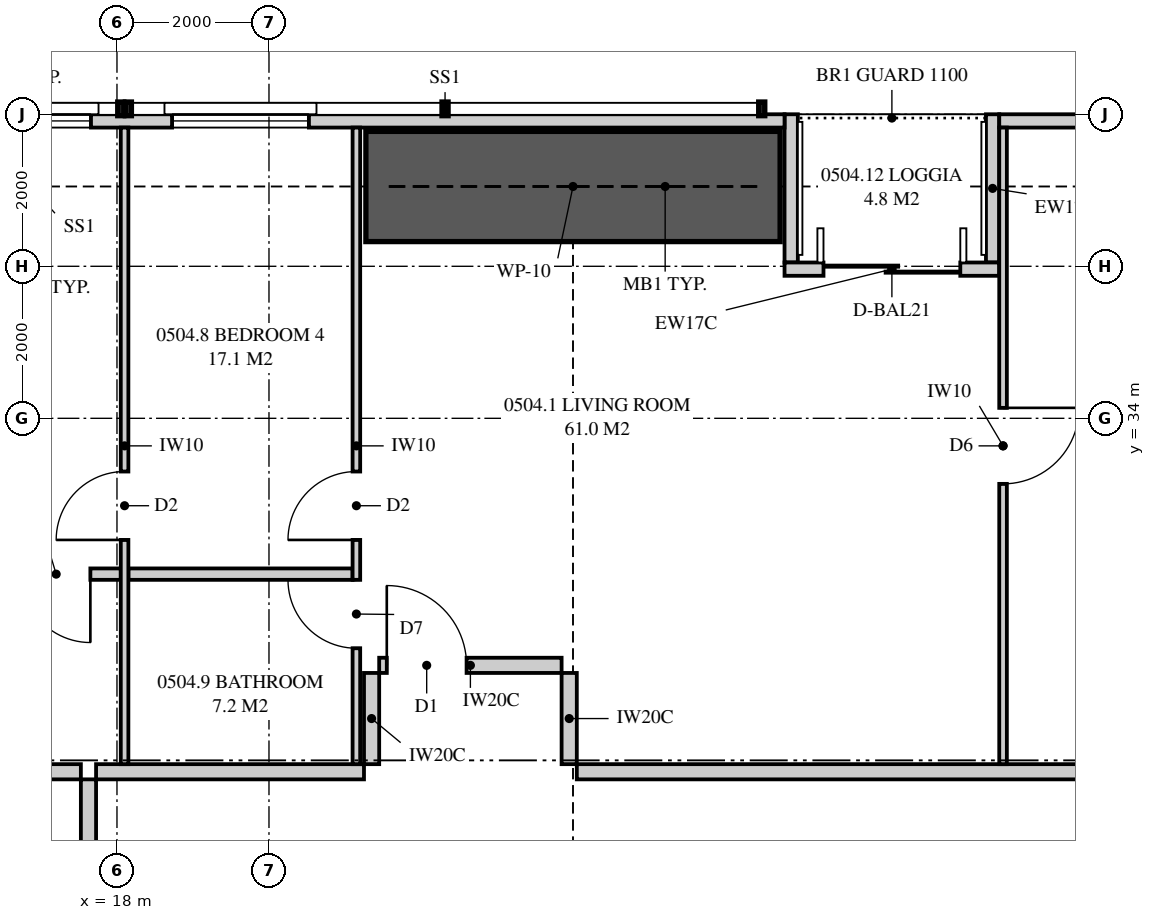
"""IFC4 building model, lengths in metres.
Left out: names, types, materials, properties, quantities, classifications, styles, units other than length and angle.
Written with IfcOpenShell. Run it as: python <this file> out.ifc"""

import sys

from ifc_helpers import new_model, si_unit, direction, frame, frame_2d, origin, place, context, subcontext, project, spatial, polyline, rectangle, outline, extrude, element, fill, save


model = new_model("IFC4")
c1 = context("Model", 3, precision=1e-05, world=origin(), true_north=direction((0.0, 1.0)))
c2 = subcontext(c1, "Body", "Model", "MODEL_VIEW")
j1 = project(units=[si_unit("LENGTHUNIT", "METRE"), si_unit("PLANEANGLEUNIT", "RADIAN")], contexts=[c1])
p1 = place(None, origin())
s1 = spatial("IfcSite", under=j1, at=p1, CompositionType="ELEMENT")
p2 = place(p1, origin())
s2 = spatial("IfcBuilding", under=s1, at=p2, CompositionType="ELEMENT")
p3 = place(p2, frame((0.0, 0.0, 24.35)))
s3 = spatial("IfcBuildingStorey", under=s2, at=p3, CompositionType="ELEMENT", Elevation=24.35)
p4 = place(p3, frame((38.174, 37.913, 0.0), z_axis=(0.0, 0.0, 1.0), x_axis=(-1.0, 0.0, 0.0)))
e1 = element("IfcWall", 1, at=p4, inside=s3, PredefinedType="SOLIDWALL", context=c2, shape_type="SweptSolid", body=[
    extrude(outline(polyline([(0.0, 0.0), (8.565, 0.0), (8.565, 2.15), (3.174, 2.15), (3.174, 3.11), (3.018, 3.11), (3.018, 2.15), (2.97, 2.15), (2.97, 3.11), (0.0, 3.11), (0.0, 0.0)])), frame((0.0, 0.087, 0.0), z_axis=(0.0, -1.0, 0.0), x_axis=(1.0, 0.0, 0.0)), (0.0, 0.0, 1.0), 0.175),
])
p5 = place(p4, frame((6.092, 0.0, 0.4)))
e2 = element("IfcOpeningElement", 2, at=p5, cuts=e1, PredefinedType="OPENING", context=c2, shape_type="SweptSolid", body=[
    extrude(rectangle(XDim=1.2, YDim=1.7, at=frame_2d((0.6, 0.85))), frame((0.0, 0.097, 0.0), z_axis=(0.0, -1.0, 0.0), x_axis=(1.0, 0.0, 0.0)), (0.0, 0.0, 1.0), 0.195),
])
p6 = place(p3, frame((26.783, 37.913, 0.0), z_axis=(0.0, 0.0, 1.0), x_axis=(-1.0, 0.0, 0.0)))
e3 = element("IfcWall", 3, at=p6, inside=s3, PredefinedType="SOLIDWALL", context=c2, shape_type="SweptSolid", body=[
    extrude(outline(polyline([(0.0, 0.0), (21.732, 0.0), (21.732, 3.11), (13.987, 3.11), (13.987, 2.15), (13.939, 2.15), (13.939, 3.11), (13.783, 3.11), (13.783, 2.15), (0.0, 2.15), (0.0, 0.0)])), frame((0.0, 0.087, 0.0), z_axis=(0.0, -1.0, 0.0), x_axis=(1.0, 0.0, 0.0)), (0.0, 0.0, 1.0), 0.175),
])
p7 = place(p6, frame((6.258, 0.0, 0.4)))
e4 = element("IfcOpeningElement", 4, at=p7, cuts=e3, PredefinedType="OPENING", context=c2, shape_type="SweptSolid", body=[
    extrude(rectangle(XDim=1.8, YDim=1.7, at=frame_2d((0.9, 0.85))), frame((0.0, 0.097, 0.0), z_axis=(0.0, -1.0, 0.0), x_axis=(1.0, 0.0, 0.0)), (0.0, 0.0, 1.0), 0.195),
])
p8 = place(p6, frame((9.126, 0.0, 0.4)))
e5 = element("IfcOpeningElement", 5, at=p8, cuts=e3, PredefinedType="OPENING", context=c2, shape_type="SweptSolid", body=[
    extrude(rectangle(XDim=1.8, YDim=1.7, at=frame_2d((0.9, 0.85))), frame((0.0, 0.097, 0.0), z_axis=(0.0, -1.0, 0.0), x_axis=(1.0, 0.0, 0.0)), (0.0, 0.0, 1.0), 0.195),
])
p9 = place(p6, frame((16.613, 0.0, 0.4)))
e6 = element("IfcOpeningElement", 6, at=p9, cuts=e3, PredefinedType="OPENING", context=c2, shape_type="SweptSolid", body=[
    extrude(rectangle(XDim=1.8, YDim=1.7, at=frame_2d((0.9, 0.85))), frame((0.0, 0.097, 0.0), z_axis=(0.0, -1.0, 0.0), x_axis=(1.0, 0.0, 0.0)), (0.0, 0.0, 1.0), 0.195),
])
p10 = place(p3, frame((29.608, 35.962, 0.0), z_axis=(0.0, 0.0, 1.0), x_axis=(-1.0, 0.0, 0.0)))
e7 = element("IfcWall", 7, at=p10, inside=s3, PredefinedType="SOLIDWALL", context=c2, shape_type="SweptSolid", body=[
    extrude(rectangle(XDim=2.825, YDim=0.175, at=frame_2d((1.413, 0.0))), origin(), (0.0, 0.0, 1.0), 3.11),
])
p11 = place(p10, frame((0.512, 0.0, 0.0)))
e8 = element("IfcOpeningElement", 8, at=p11, cuts=e7, PredefinedType="OPENING", context=c2, shape_type="SweptSolid", body=[
    extrude(rectangle(XDim=1.8, YDim=2.1, at=frame_2d((0.9, 1.05))), frame((0.0, 0.097, 0.0), z_axis=(0.0, -1.0, 0.0), x_axis=(1.0, 0.0, 0.0)), (0.0, 0.0, 1.0), 0.195),
])
for number, where, z_axis, x_axis in (
    (9, (29.521, 38.0, 0.0), (0.0, 0.0, 1.0), (0.0, -1.0, 0.0)),
    (10, (26.871, 38.0, 0.0), (0.0, 0.0, 1.0), (0.0, -1.0, 0.0)),
):
    element("IfcWall", number, at=place(p3, frame(where, z_axis=z_axis, x_axis=x_axis)), inside=s3, PredefinedType="SOLIDWALL", context=c2, shape_type="SweptSolid", body=[
        extrude(outline(polyline([(0.0, 0.0), (1.95, 0.0), (1.95, 3.11), (1.75, 3.11), (1.75, 2.15), (0.15, 2.15), (0.15, 3.11), (0.0, 3.11), (0.0, 0.0)])), frame((0.0, 0.087, 0.0), z_axis=(0.0, -1.0, 0.0), x_axis=(1.0, 0.0, 0.0)), (0.0, 0.0, 1.0), 0.175),
    ])
p12 = place(p3, frame((17.725, 29.35, 0.0), z_axis=(0.0, 0.0, 1.0), x_axis=(1.0, 0.0, 0.0)))
e11 = element("IfcWall", 11, at=p12, inside=s3, PredefinedType="PARTITIONING", context=c2, shape_type="SweptSolid", body=[
    extrude(rectangle(XDim=3.525, YDim=0.2, at=frame_2d((1.762, 0.0))), origin(), (0.0, 0.0, 1.0), 3.11),
])
p13 = place(p3, frame((18.1, 37.825, 0.0), z_axis=(0.0, 0.0, 1.0), x_axis=(0.0, -1.0, 0.0)))
e12 = element("IfcWall", 12, at=p13, inside=s3, PredefinedType="PARTITIONING", context=c2, shape_type="SweptSolid", body=[
    extrude(outline(polyline([(0.0, 0.0), (8.375, 0.0), (8.375, 3.11), (1.635, 3.11), (1.635, 2.15), (0.0, 2.15), (0.0, 3.11), (0.0, 0.0)])), frame((0.0, 0.05, 0.0), z_axis=(0.0, -1.0, 0.0), x_axis=(1.0, 0.0, 0.0)), (0.0, 0.0, 1.0), 0.1),
])
p14 = place(p13, frame((4.525, 0.0, 0.0)))
e13 = element("IfcOpeningElement", 13, at=p14, cuts=e12, PredefinedType="OPENING", context=c2, shape_type="SweptSolid", body=[
    extrude(rectangle(XDim=0.9, YDim=2.1, at=frame_2d((0.45, 1.05))), frame((0.0, 0.06, 0.0), z_axis=(0.0, -1.0, 0.0), x_axis=(1.0, 0.0, 0.0)), (0.0, 0.0, 1.0), 0.12),
])
p15 = place(p3, frame((21.15, 37.825, 0.0), z_axis=(0.0, 0.0, 1.0), x_axis=(0.0, -1.0, 0.0)))
e14 = element("IfcWall", 14, at=p15, inside=s3, PredefinedType="PARTITIONING", context=c2, shape_type="SweptSolid", body=[
    extrude(outline(polyline([(0.0, 0.0), (8.375, 0.0), (8.375, 3.11), (1.635, 3.11), (1.635, 2.15), (0.0, 2.15), (0.0, 3.11), (0.0, 0.0)])), frame((0.0, 0.05, 0.0), z_axis=(0.0, -1.0, 0.0), x_axis=(1.0, 0.0, 0.0)), (0.0, 0.0, 1.0), 0.1),
])
p16 = place(p15, frame((4.525, 0.0, 0.0)))
e15 = element("IfcOpeningElement", 15, at=p16, cuts=e14, PredefinedType="OPENING", context=c2, shape_type="SweptSolid", body=[
    extrude(rectangle(XDim=0.9, YDim=2.1, at=frame_2d((0.45, 1.05))), frame((0.0, 0.06, 0.0), z_axis=(0.0, -1.0, 0.0), x_axis=(1.0, 0.0, 0.0)), (0.0, 0.0, 1.0), 0.12),
])
p17 = place(p15, frame((5.95, 0.0, 0.0)))
e16 = element("IfcOpeningElement", 16, at=p17, cuts=e14, PredefinedType="OPENING", context=c2, shape_type="SweptSolid", body=[
    extrude(rectangle(XDim=0.9, YDim=2.1, at=frame_2d((0.45, 1.05))), frame((0.0, 0.06, 0.0), z_axis=(0.0, -1.0, 0.0), x_axis=(1.0, 0.0, 0.0)), (0.0, 0.0, 1.0), 0.12),
])
p18 = place(p3, frame((13.85, 31.95, 0.0), z_axis=(0.0, 0.0, 1.0), x_axis=(1.0, 0.0, 0.0)))
e17 = element("IfcWall", 17, at=p18, inside=s3, PredefinedType="PLUMBINGWALL", context=c2, shape_type="SweptSolid", body=[
    extrude(rectangle(XDim=4.2, YDim=0.15, at=frame_2d((2.1, 0.0))), origin(), (0.0, 0.0, 1.0), 3.11),
])
p19 = place(p18, frame((2.9, 0.0, 0.0)))
e18 = element("IfcOpeningElement", 18, at=p19, cuts=e17, PredefinedType="OPENING", context=c2, shape_type="SweptSolid", body=[
    extrude(rectangle(XDim=0.9, YDim=2.1, at=frame_2d((0.45, 1.05))), frame((0.0, 0.085, 0.0), z_axis=(0.0, -1.0, 0.0), x_axis=(1.0, 0.0, 0.0)), (0.0, 0.0, 1.0), 0.17),
])
p20 = place(p3, frame((18.15, 31.95, 0.0), z_axis=(0.0, 0.0, 1.0), x_axis=(1.0, 0.0, 0.0)))
e19 = element("IfcWall", 19, at=p20, inside=s3, PredefinedType="PLUMBINGWALL", context=c2, shape_type="SweptSolid", body=[
    extrude(rectangle(XDim=2.95, YDim=0.15, at=frame_2d((1.475, 0.0))), origin(), (0.0, 0.0, 1.0), 3.11),
])
p21 = place(p3, frame((29.658, 37.825, 0.0), z_axis=(0.0, 0.0, 1.0), x_axis=(0.0, -1.0, 0.0)))
e20 = element("IfcWall", 20, at=p21, inside=s3, PredefinedType="PARTITIONING", context=c2, shape_type="SweptSolid", body=[
    extrude(outline(polyline([(0.0, 0.0), (8.375, 0.0), (8.375, 3.11), (1.635, 3.11), (1.635, 2.15), (0.0, 2.15), (0.0, 3.11), (0.0, 0.0)])), frame((0.0, 0.05, 0.0), z_axis=(0.0, -1.0, 0.0), x_axis=(1.0, 0.0, 0.0)), (0.0, 0.0, 1.0), 0.1),
])
p22 = place(p21, frame((3.688, 0.0, 0.0)))
e21 = element("IfcOpeningElement", 21, at=p22, cuts=e20, PredefinedType="OPENING", context=c2, shape_type="SweptSolid", body=[
    extrude(rectangle(XDim=1.0, YDim=2.1, at=frame_2d((0.5, 1.05))), frame((0.0, 0.06, 0.0), z_axis=(0.0, -1.0, 0.0), x_axis=(1.0, 0.0, 0.0)), (0.0, 0.0, 1.0), 0.12),
])
p23 = place(p3, frame((2.0, 29.35, 0.0), z_axis=(0.0, 0.0, 1.0), x_axis=(1.0, 0.0, 0.0)))
e22 = element("IfcWall", 22, at=p23, inside=s3, PredefinedType="PARTITIONING", context=c2, shape_type="SweptSolid", body=[
    extrude(outline(polyline([(0.0, 0.0), (15.525, 0.0), (15.525, 3.11), (11.337, 3.11), (11.337, 2.541), (10.663, 2.541), (10.663, 3.11), (9.51, 3.11), (9.51, 2.51), (6.89, 2.51), (6.89, 3.11), (2.969, 3.11), (2.969, 2.541), (2.577, 2.541), (2.577, 2.15), (0.733, 2.15), (0.733, 3.11), (0.0, 3.11), (0.0, 0.0)])), frame((0.0, 0.1, 0.0), z_axis=(0.0, -1.0, 0.0), x_axis=(1.0, 0.0, 0.0)), (0.0, 0.0, 1.0), 0.2),
])
p24 = place(p3, frame((24.05, 29.35, 0.0), z_axis=(0.0, 0.0, 1.0), x_axis=(1.0, 0.0, 0.0)))
e23 = element("IfcWall", 23, at=p24, inside=s3, PredefinedType="PARTITIONING", context=c2, shape_type="SweptSolid", body=[
    extrude(outline(polyline([(0.0, 0.0), (13.05, 0.0), (13.05, 3.11), (11.287, 3.11), (11.287, 2.541), (10.613, 2.541), (10.613, 3.11), (0.287, 3.11), (0.287, 2.541), (0.0, 2.541), (0.0, 3.11), (0.0, 0.0)])), frame((0.0, 0.1, 0.0), z_axis=(0.0, -1.0, 0.0), x_axis=(1.0, 0.0, 0.0)), (0.0, 0.0, 1.0), 0.2),
])
p25 = place(p3, frame((21.45, 30.75, 0.0), z_axis=(0.0, 0.0, 1.0), x_axis=(1.0, 0.0, 0.0)))
e24 = element("IfcWall", 24, at=p25, inside=s3, PredefinedType="PARTITIONING", context=c2, shape_type="SweptSolid", body=[
    extrude(outline(polyline([(0.0, 0.0), (2.4, 0.0), (2.4, 3.11), (2.4, 2.541), (2.213, 2.541), (2.213, 3.11), (0.0, 3.11), (0.0, 0.0)])), frame((0.0, 0.1, 0.0), z_axis=(0.0, -1.0, 0.0), x_axis=(1.0, 0.0, 0.0)), (0.0, 0.0, 1.0), 0.2),
])
p26 = place(p25, frame((0.1, 0.0, 0.0)))
e25 = element("IfcOpeningElement", 25, at=p26, cuts=e24, PredefinedType="OPENING", context=c2, shape_type="SweptSolid", body=[
    extrude(rectangle(XDim=1.05, YDim=2.2, at=frame_2d((0.525, 1.1))), frame((0.0, 0.11, 0.0), z_axis=(0.0, -1.0, 0.0), x_axis=(1.0, 0.0, 0.0)), (0.0, 0.0, 1.0), 0.22),
])
p27 = place(p3, frame((21.35, 29.45, 0.0), z_axis=(0.0, 0.0, 1.0), x_axis=(0.0, 1.0, 0.0)))
e26 = element("IfcWall", 26, at=p27, inside=s3, PredefinedType="PARTITIONING", context=c2, shape_type="SweptSolid", body=[
    extrude(rectangle(XDim=1.2, YDim=0.2, at=frame_2d((0.6, 0.0))), origin(), (0.0, 0.0, 1.0), 3.11),
])
p28 = place(p3, frame((23.95, 29.45, 0.0), z_axis=(0.0, 0.0, 1.0), x_axis=(0.0, 1.0, 0.0)))
e27 = element("IfcWall", 27, at=p28, inside=s3, PredefinedType="PARTITIONING", context=c2, shape_type="SweptSolid", body=[
    extrude(outline(polyline([(0.0, 0.0), (1.2, 0.0), (1.2, 3.11), (1.2, 2.541), (0.0, 2.541), (0.0, 3.11), (0.0, 0.0)])), frame((0.0, 0.1, 0.0), z_axis=(0.0, -1.0, 0.0), x_axis=(1.0, 0.0, 0.0)), (0.0, 0.0, 1.0), 0.2),
])
p29 = place(p3, frame((17.625, 19.9, 0.0), z_axis=(0.0, 0.0, 1.0), x_axis=(0.0, 1.0, 0.0)))
e28 = element("IfcWall", 28, at=p29, inside=s3, PredefinedType="PARTITIONING", context=c2, shape_type="SweptSolid", body=[
    extrude(outline(polyline([(0.0, 0.0), (9.35, 0.0), (9.35, 3.11), (5.437, 3.11), (5.437, 2.541), (4.763, 2.541), (4.763, 3.11), (0.0, 3.11), (0.0, 0.0)])), frame((0.0, 0.1, 0.0), z_axis=(0.0, -1.0, 0.0), x_axis=(1.0, 0.0, 0.0)), (0.0, 0.0, 1.0), 0.2),
])
p30 = place(p3, frame((21.275, 37.05, 0.0), z_axis=(0.0, 0.0, 1.0), x_axis=(1.0, 0.0, 0.0)))
e29 = element("IfcWall", 29, at=p30, inside=s3, PredefinedType="SHEAR", context=c2, shape_type="SweptSolid", body=[
    extrude(rectangle(XDim=5.45, YDim=1.45, at=frame_2d((2.725, 0.0))), origin(), (0.0, 0.0, 1.0), 3.35),
])
p31 = place(p11, origin())
e30 = element("IfcDoor", 30, at=p31, inside=s3, OperationType="SLIDING_TO_LEFT", PredefinedType="DOOR", context=c2, shape_type="SweptSolid", body=[
    extrude(rectangle(XDim=1.8, YDim=2.1, at=frame_2d((0.9, 1.05))), frame((0.0, 0.025, 0.0), z_axis=(0.0, -1.0, 0.0), x_axis=(1.0, 0.0, 0.0)), (0.0, 0.0, 1.0), 0.05),
])
fill(e8, e30)
p32 = place(p7, origin())
e31 = element("IfcWindow", 31, at=p32, inside=s3, PartitioningType="SINGLE_PANEL", PredefinedType="WINDOW", context=c2, shape_type="SweptSolid", body=[
    extrude(rectangle(XDim=1.8, YDim=1.7, at=frame_2d((0.9, 0.85))), frame((0.0, 0.03, 0.0), z_axis=(0.0, -1.0, 0.0), x_axis=(1.0, 0.0, 0.0)), (0.0, 0.0, 1.0), 0.06),
])
fill(e4, e31)
p33 = place(p8, origin())
e32 = element("IfcWindow", 32, at=p33, inside=s3, PartitioningType="SINGLE_PANEL", PredefinedType="WINDOW", context=c2, shape_type="SweptSolid", body=[
    extrude(rectangle(XDim=1.8, YDim=1.7, at=frame_2d((0.9, 0.85))), frame((0.0, 0.03, 0.0), z_axis=(0.0, -1.0, 0.0), x_axis=(1.0, 0.0, 0.0)), (0.0, 0.0, 1.0), 0.06),
])
fill(e5, e32)
p34 = place(p26, origin())
e33 = element("IfcDoor", 33, at=p34, inside=s3, OperationType="SINGLE_SWING_LEFT", PredefinedType="DOOR", context=c2, shape_type="SweptSolid", body=[
    extrude(rectangle(XDim=1.05, YDim=2.2, at=frame_2d((0.525, 1.1))), frame((0.0, 0.025, 0.0), z_axis=(0.0, -1.0, 0.0), x_axis=(1.0, 0.0, 0.0)), (0.0, 0.0, 1.0), 0.05),
])
fill(e25, e33)
p35 = place(p14, frame((0.9, 0.0, 0.0), z_axis=(0.0, 0.0, 1.0), x_axis=(-1.0, 0.0, 0.0)))
e34 = element("IfcDoor", 34, at=p35, inside=s3, OperationType="SINGLE_SWING_LEFT", PredefinedType="DOOR", context=c2, shape_type="SweptSolid", body=[
    extrude(rectangle(XDim=0.9, YDim=2.1, at=frame_2d((0.45, 1.05))), frame((0.0, 0.025, 0.0), z_axis=(0.0, -1.0, 0.0), x_axis=(1.0, 0.0, 0.0)), (0.0, 0.0, 1.0), 0.05),
])
fill(e13, e34)
p36 = place(p19, frame((0.9, 0.0, 0.0), z_axis=(0.0, 0.0, 1.0), x_axis=(-1.0, 0.0, 0.0)))
e35 = element("IfcDoor", 35, at=p36, inside=s3, OperationType="SINGLE_SWING_LEFT", PredefinedType="DOOR", context=c2, shape_type="SweptSolid", body=[
    extrude(rectangle(XDim=0.9, YDim=2.1, at=frame_2d((0.45, 1.05))), frame((0.0, 0.025, 0.0), z_axis=(0.0, -1.0, 0.0), x_axis=(1.0, 0.0, 0.0)), (0.0, 0.0, 1.0), 0.05),
])
fill(e18, e35)
p37 = place(p16, frame((0.9, 0.0, 0.0), z_axis=(0.0, 0.0, 1.0), x_axis=(-1.0, 0.0, 0.0)))
e36 = element("IfcDoor", 36, at=p37, inside=s3, OperationType="SINGLE_SWING_LEFT", PredefinedType="DOOR", context=c2, shape_type="SweptSolid", body=[
    extrude(rectangle(XDim=0.9, YDim=2.1, at=frame_2d((0.45, 1.05))), frame((0.0, 0.025, 0.0), z_axis=(0.0, -1.0, 0.0), x_axis=(1.0, 0.0, 0.0)), (0.0, 0.0, 1.0), 0.05),
])
fill(e15, e36)
p38 = place(p17, frame((0.9, 0.0, 0.0), z_axis=(0.0, 0.0, 1.0), x_axis=(-1.0, 0.0, 0.0)))
e37 = element("IfcDoor", 37, at=p38, inside=s3, OperationType="SINGLE_SWING_RIGHT", PredefinedType="DOOR", context=c2, shape_type="SweptSolid", body=[
    extrude(rectangle(XDim=0.9, YDim=2.1, at=frame_2d((0.45, 1.05))), frame((0.0, 0.025, 0.0), z_axis=(0.0, -1.0, 0.0), x_axis=(1.0, 0.0, 0.0)), (0.0, 0.0, 1.0), 0.05),
])
fill(e16, e37)
p39 = place(p22, origin())
e38 = element("IfcDoor", 38, at=p39, inside=s3, OperationType="SINGLE_SWING_LEFT", PredefinedType="DOOR", context=c2, shape_type="SweptSolid", body=[
    extrude(rectangle(XDim=1.0, YDim=2.1, at=frame_2d((0.5, 1.05))), frame((0.0, 0.025, 0.0), z_axis=(0.0, -1.0, 0.0), x_axis=(1.0, 0.0, 0.0)), (0.0, 0.0, 1.0), 0.05),
])
fill(e21, e38)
save(model, sys.argv[1])
